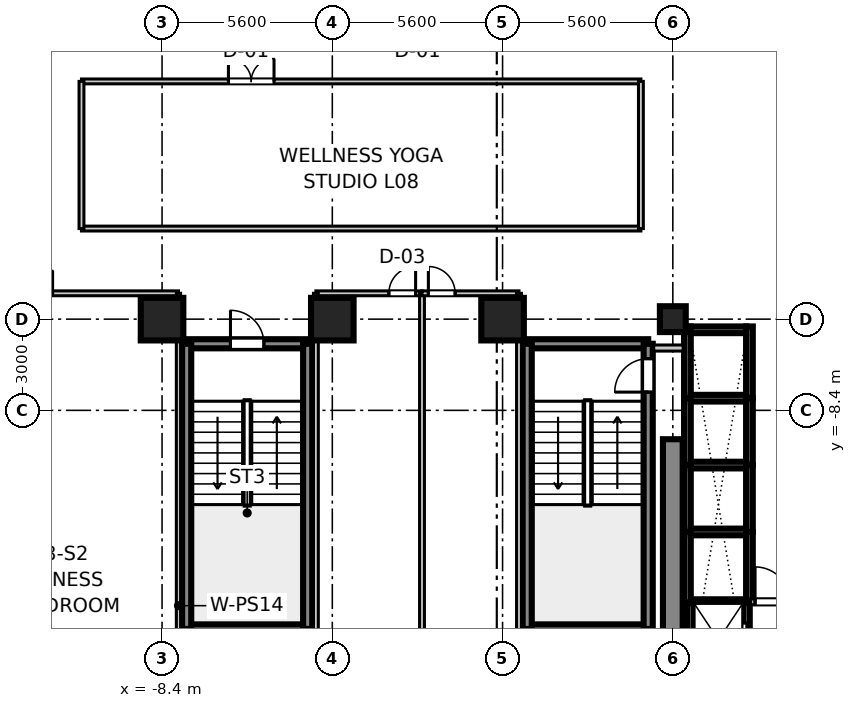
"""IFC4 building model, lengths in metres.
Left out: names, types, materials, properties, quantities, classifications, styles, units other than length and angle.
Written with IfcOpenShell. Run it as: python <this file> out.ifc"""

import sys

from ifc_helpers import new_model, si_unit, direction, frame, frame_2d, origin, origin_2d, place, context, subcontext, project, spatial, rectangle, extrude, source, transform, mapped, element, fill, save


model = new_model("IFC4")
c1 = context("Model", 3, precision=1e-05, world=origin(), true_north=direction((0.0, 1.0)))
c2 = subcontext(c1, "Body", "Model", "MODEL_VIEW")
j1 = project(units=[si_unit("LENGTHUNIT", "METRE"), si_unit("PLANEANGLEUNIT", "RADIAN")], contexts=[c1])
p1 = place(None, origin())
s1 = spatial("IfcSite", under=j1, at=p1, CompositionType="ELEMENT")
p2 = place(p1, origin())
s2 = spatial("IfcBuilding", under=s1, at=p2, CompositionType="ELEMENT")
p3 = place(p2, frame((0.0, 0.0, 39.7)))
s3 = spatial("IfcBuildingStorey", under=s2, at=p3, CompositionType="ELEMENT", Elevation=39.7)
m1 = source(origin(), c2, "Body", "SweptSolid", [
    extrude(rectangle(XDim=1.4, YDim=1.4, at=origin_2d()), origin(), (0.0, 0.0, 1.0), 3.605),
])
for number, where, z_axis, x_axis in (
    (1, (-8.4, -5.4, 0.0), (0.0, 0.0, 1.0), (1.0, 0.0, 0.0)),
    (2, (-2.8, -5.4, 0.0), (0.0, 0.0, 1.0), (1.0, 0.0, 0.0)),
    (3, (2.8, -5.4, 0.0), (0.0, 0.0, 1.0), (1.0, 0.0, 0.0)),
):
    element("IfcColumn", number, at=place(p3, frame(where, z_axis=z_axis, x_axis=x_axis)), inside=s3, PredefinedType="COLUMN", context=c2, shape_type="MappedRepresentation", body=[
        mapped(m1, transform((0.0, 0.0, 0.0), scale=1.0)),
    ])
m2 = source(origin(), c2, "Body", "SweptSolid", [
    extrude(rectangle(XDim=0.85, YDim=0.85, at=origin_2d()), origin(), (0.0, 0.0, 1.0), 3.605),
])
p4 = place(p3, frame((8.4, -5.4, 0.0), z_axis=(0.0, 0.0, 1.0), x_axis=(1.0, 0.0, 0.0)))
e4 = element("IfcColumn", 4, at=p4, inside=s3, PredefinedType="PILASTER", context=c2, shape_type="MappedRepresentation", body=[
    mapped(m2, transform((0.0, 0.0, 0.0), scale=1.0)),
])
m3 = source(origin(), c2, "Body", "SweptSolid", [
    extrude(rectangle(XDim=7.65, YDim=0.65, at=frame_2d((3.825, 0.0))), origin(), (0.0, 0.0, 1.0), 3.37),
])
p5 = place(p3, frame((8.4, -17.0, 0.0), z_axis=(0.0, 0.0, 1.0), x_axis=(0.0, 1.0, 0.0)))
e5 = element("IfcWall", 5, at=p5, inside=s3, PredefinedType="SHEAR", context=c2, shape_type="MappedRepresentation", body=[
    mapped(m3, transform((0.0, 0.0, 0.0), scale=1.0)),
])
m4 = source(origin(), c2, "Body", "SweptSolid", [
    extrude(rectangle(XDim=3.98, YDim=0.3, at=frame_2d((1.99, 0.0))), origin(), (0.0, 0.0, 1.0), 3.37),
])
for number, where, z_axis, x_axis in (
    (6, (3.61, -15.59, 0.0), (0.0, 0.0, 1.0), (1.0, 0.0, 0.0)),
    (7, (3.61, -6.21, 0.0), (0.0, 0.0, 1.0), (1.0, 0.0, 0.0)),
):
    element("IfcWall", number, at=place(p3, frame(where, z_axis=z_axis, x_axis=x_axis)), inside=s3, PredefinedType="SHEAR", context=c2, shape_type="MappedRepresentation", body=[
        mapped(m4, transform((0.0, 0.0, 0.0), scale=1.0)),
    ])
m5 = source(origin(), c2, "Body", "SweptSolid", [
    extrude(rectangle(XDim=9.38, YDim=0.3, at=frame_2d((4.69, 0.0))), origin(), (0.0, 0.0, 1.0), 3.37),
])
p6 = place(p3, frame((3.61, -15.59, 0.0), z_axis=(0.0, 0.0, 1.0), x_axis=(0.0, 1.0, 0.0)))
e8 = element("IfcWall", 8, at=p6, inside=s3, PredefinedType="SHEAR", context=c2, shape_type="MappedRepresentation", body=[
    mapped(m5, transform((0.0, 0.0, 0.0), scale=1.0)),
])
p7 = place(p3, frame((7.59, -15.59, 0.0), z_axis=(0.0, 0.0, 1.0), x_axis=(0.0, 1.0, 0.0)))
e9 = element("IfcWall", 9, at=p7, inside=s3, PredefinedType="SHEAR", context=c2, shape_type="MappedRepresentation", body=[
    mapped(m5, transform((0.0, 0.0, 0.0), scale=1.0)),
])
p8 = place(p7, frame((7.79, 0.0, 0.0)))
e10 = element("IfcOpeningElement", 10, at=p8, cuts=e9, PredefinedType="OPENING", context=c2, shape_type="SweptSolid", body=[
    extrude(rectangle(XDim=1.1, YDim=2.15, at=frame_2d((0.55, 1.075))), frame((0.0, 0.16, 0.0), z_axis=(0.0, -1.0, 0.0), x_axis=(1.0, 0.0, 0.0)), (0.0, 0.0, 1.0), 0.32),
])
p9 = place(p3, frame((-7.59, -15.59, 0.0), z_axis=(0.0, 0.0, 1.0), x_axis=(1.0, 0.0, 0.0)))
e11 = element("IfcWall", 11, at=p9, inside=s3, PredefinedType="SHEAR", context=c2, shape_type="MappedRepresentation", body=[
    mapped(m4, transform((0.0, 0.0, 0.0), scale=1.0)),
])
p10 = place(p3, frame((-7.59, -6.21, 0.0), z_axis=(0.0, 0.0, 1.0), x_axis=(1.0, 0.0, 0.0)))
e12 = element("IfcWall", 12, at=p10, inside=s3, PredefinedType="SHEAR", context=c2, shape_type="MappedRepresentation", body=[
    mapped(m4, transform((0.0, 0.0, 0.0), scale=1.0)),
])
p11 = place(p10, frame((1.44, 0.0, 0.0)))
e13 = element("IfcOpeningElement", 13, at=p11, cuts=e12, PredefinedType="OPENING", context=c2, shape_type="SweptSolid", body=[
    extrude(rectangle(XDim=1.1, YDim=2.15, at=frame_2d((0.55, 1.075))), frame((0.0, 0.16, 0.0), z_axis=(0.0, -1.0, 0.0), x_axis=(1.0, 0.0, 0.0)), (0.0, 0.0, 1.0), 0.32),
])
for number, where, z_axis, x_axis in (
    (14, (-7.59, -15.59, 0.0), (0.0, 0.0, 1.0), (0.0, 1.0, 0.0)),
    (15, (-3.61, -15.59, 0.0), (0.0, 0.0, 1.0), (0.0, 1.0, 0.0)),
):
    element("IfcWall", number, at=place(p3, frame(where, z_axis=z_axis, x_axis=x_axis)), inside=s3, PredefinedType="SHEAR", context=c2, shape_type="MappedRepresentation", body=[
        mapped(m5, transform((0.0, 0.0, 0.0), scale=1.0)),
    ])
m6 = source(origin(), c2, "Body", "SweptSolid", [
    extrude(rectangle(XDim=2.36, YDim=0.22, at=frame_2d((1.18, 0.0))), origin(), (0.0, 0.0, 1.0), 3.37),
])
for number, where, z_axis, x_axis in (
    (16, (8.88, -8.0, 0.0), (0.0, 0.0, 1.0), (0.0, 1.0, 0.0)),
    (17, (10.92, -8.0, 0.0), (0.0, 0.0, 1.0), (0.0, 1.0, 0.0)),
):
    element("IfcWall", number, at=place(p3, frame(where, z_axis=z_axis, x_axis=x_axis)), inside=s3, PredefinedType="SHEAR", context=c2, shape_type="MappedRepresentation", body=[
        mapped(m6, transform((0.0, 0.0, 0.0), scale=1.0)),
    ])
m7 = source(origin(), c2, "Body", "SweptSolid", [
    extrude(rectangle(XDim=1.82, YDim=0.22, at=frame_2d((0.91, 0.0))), origin(), (0.0, 0.0, 1.0), 3.37),
])
p12 = place(p3, frame((8.99, -5.75, 0.0), z_axis=(0.0, 0.0, 1.0), x_axis=(1.0, 0.0, 0.0)))
e18 = element("IfcWall", 18, at=p12, inside=s3, PredefinedType="SHEAR", context=c2, shape_type="MappedRepresentation", body=[
    mapped(m7, transform((0.0, 0.0, 0.0), scale=1.0)),
])
m8 = source(origin(), c2, "Body", "SweptSolid", [
    extrude(rectangle(XDim=2.2, YDim=0.22, at=frame_2d((1.1, 0.0))), origin(), (0.0, 0.0, 1.0), 3.37),
])
for number, where, z_axis, x_axis in (
    (19, (8.88, -10.2, 0.0), (0.0, 0.0, 1.0), (0.0, 1.0, 0.0)),
    (20, (10.92, -10.2, 0.0), (0.0, 0.0, 1.0), (0.0, 1.0, 0.0)),
):
    element("IfcWall", number, at=place(p3, frame(where, z_axis=z_axis, x_axis=x_axis)), inside=s3, PredefinedType="SHEAR", context=c2, shape_type="MappedRepresentation", body=[
        mapped(m8, transform((0.0, 0.0, 0.0), scale=1.0)),
    ])
m9 = source(origin(), c2, "Body", "SweptSolid", [
    extrude(rectangle(XDim=1.82, YDim=0.22, at=frame_2d((0.91, 0.0))), origin(), (0.0, 0.0, 1.0), 3.65),
])
p13 = place(p3, frame((8.99, -8.0, 0.0), z_axis=(0.0, 0.0, 1.0), x_axis=(1.0, 0.0, 0.0)))
e21 = element("IfcWall", 21, at=p13, inside=s3, PredefinedType="SHEAR", context=c2, shape_type="MappedRepresentation", body=[
    mapped(m9, transform((0.0, 0.0, 0.0), scale=1.0)),
])
for number, where, z_axis, x_axis in (
    (22, (8.88, -12.4, 0.0), (0.0, 0.0, 1.0), (0.0, 1.0, 0.0)),
    (23, (10.92, -12.4, 0.0), (0.0, 0.0, 1.0), (0.0, 1.0, 0.0)),
):
    element("IfcWall", number, at=place(p3, frame(where, z_axis=z_axis, x_axis=x_axis)), inside=s3, PredefinedType="SHEAR", context=c2, shape_type="MappedRepresentation", body=[
        mapped(m8, transform((0.0, 0.0, 0.0), scale=1.0)),
    ])
p14 = place(p3, frame((8.99, -10.2, 0.0), z_axis=(0.0, 0.0, 1.0), x_axis=(1.0, 0.0, 0.0)))
e24 = element("IfcWall", 24, at=p14, inside=s3, PredefinedType="SHEAR", context=c2, shape_type="MappedRepresentation", body=[
    mapped(m9, transform((0.0, 0.0, 0.0), scale=1.0)),
])
m10 = source(origin(), c2, "Body", "SweptSolid", [
    extrude(rectangle(XDim=2.325, YDim=0.22, at=frame_2d((1.163, 0.0))), origin(), (0.0, 0.0, 1.0), 3.37),
])
for number, where, z_axis, x_axis in (
    (25, (8.88, -14.725, 0.0), (0.0, 0.0, 1.0), (0.0, 1.0, 0.0)),
    (26, (10.92, -14.725, 0.0), (0.0, 0.0, 1.0), (0.0, 1.0, 0.0)),
):
    element("IfcWall", number, at=place(p3, frame(where, z_axis=z_axis, x_axis=x_axis)), inside=s3, PredefinedType="SHEAR", context=c2, shape_type="MappedRepresentation", body=[
        mapped(m10, transform((0.0, 0.0, 0.0), scale=1.0)),
    ])
p15 = place(p3, frame((8.99, -12.4, 0.0), z_axis=(0.0, 0.0, 1.0), x_axis=(1.0, 0.0, 0.0)))
e27 = element("IfcWall", 27, at=p15, inside=s3, PredefinedType="SHEAR", context=c2, shape_type="MappedRepresentation", body=[
    mapped(m9, transform((0.0, 0.0, 0.0), scale=1.0)),
])
m11 = source(origin(), c2, "Body", "SweptSolid", [
    extrude(rectangle(XDim=2.635, YDim=0.22, at=frame_2d((1.317, 0.0))), origin(), (0.0, 0.0, 1.0), 3.37),
])
p16 = place(p3, frame((8.98, -17.36, 0.0), z_axis=(0.0, 0.0, 1.0), x_axis=(0.0, 1.0, 0.0)))
e28 = element("IfcWall", 28, at=p16, inside=s3, PredefinedType="SHEAR", context=c2, shape_type="MappedRepresentation", body=[
    mapped(m11, transform((0.0, 0.0, 0.0), scale=1.0)),
])
p17 = place(p3, frame((10.82, -17.36, 0.0), z_axis=(0.0, 0.0, 1.0), x_axis=(0.0, 1.0, 0.0)))
e29 = element("IfcWall", 29, at=p17, inside=s3, PredefinedType="SHEAR", context=c2, shape_type="MappedRepresentation", body=[
    mapped(m11, transform((0.0, 0.0, 0.0), scale=1.0)),
])
p18 = place(p17, frame((0.86, 0.0, 0.0)))
e30 = element("IfcOpeningElement", 30, at=p18, cuts=e29, PredefinedType="OPENING", context=c2, shape_type="SweptSolid", body=[
    extrude(rectangle(XDim=1.1, YDim=2.2, at=frame_2d((0.55, 1.1))), frame((0.0, 0.12, 0.0), z_axis=(0.0, -1.0, 0.0), x_axis=(1.0, 0.0, 0.0)), (0.0, 0.0, 1.0), 0.24),
])
m12 = source(origin(), c2, "Body", "SweptSolid", [
    extrude(rectangle(XDim=1.62, YDim=0.22, at=frame_2d((0.81, 0.0))), origin(), (0.0, 0.0, 1.0), 3.65),
])
p19 = place(p3, frame((9.09, -14.725, 0.0), z_axis=(0.0, 0.0, 1.0), x_axis=(1.0, 0.0, 0.0)))
e31 = element("IfcWall", 31, at=p19, inside=s3, PredefinedType="SHEAR", context=c2, shape_type="MappedRepresentation", body=[
    mapped(m12, transform((0.0, 0.0, 0.0), scale=1.0)),
])
m13 = source(origin(), c2, "Body", "SweptSolid", [
    extrude(rectangle(XDim=1.46, YDim=0.2, at=frame_2d((0.73, 0.0))), origin(), (0.0, 0.0, 1.0), 2.71),
])
p20 = place(p3, frame((10.96, -14.7, 0.0), z_axis=(0.0, 0.0, 1.0), x_axis=(1.0, 0.0, 0.0)))
e32 = element("IfcWall", 32, at=p20, inside=s3, PredefinedType="PARTITIONING", context=c2, shape_type="MappedRepresentation", body=[
    mapped(m13, transform((0.0, 0.0, 0.0), scale=1.0)),
])
p21 = place(p20, frame((0.145, 0.0, 0.0)))
e33 = element("IfcOpeningElement", 33, at=p21, cuts=e32, PredefinedType="OPENING", context=c2, shape_type="SweptSolid", body=[
    extrude(rectangle(XDim=1.15, YDim=2.15, at=frame_2d((0.575, 1.075))), frame((0.0, 0.11, 0.0), z_axis=(0.0, -1.0, 0.0), x_axis=(1.0, 0.0, 0.0)), (0.0, 0.0, 1.0), 0.22),
])
m14 = source(origin(), c2, "Body", "SweptSolid", [
    extrude(rectangle(XDim=0.97, YDim=0.2, at=frame_2d((0.485, 0.0))), origin(), (0.0, 0.0, 1.0), 2.71),
])
p22 = place(p3, frame((7.77, -6.35, 0.0), z_axis=(0.0, 0.0, 1.0), x_axis=(1.0, 0.0, 0.0)))
e34 = element("IfcWall", 34, at=p22, inside=s3, PredefinedType="PARTITIONING", context=c2, shape_type="MappedRepresentation", body=[
    mapped(m14, transform((0.0, 0.0, 0.0), scale=1.0)),
])
m15 = source(origin(), c2, "Body", "SweptSolid", [
    extrude(rectangle(XDim=14.5, YDim=0.16, at=frame_2d((7.25, 0.0))), origin(), (0.0, 0.0, 1.0), 2.71),
])
p23 = place(p3, frame((-22.36, -4.55, 0.0), z_axis=(0.0, 0.0, 1.0), x_axis=(1.0, 0.0, 0.0)))
e35 = element("IfcWall", 35, at=p23, inside=s3, PredefinedType="PARTITIONING", context=c2, shape_type="MappedRepresentation", body=[
    mapped(m15, transform((0.0, 0.0, 0.0), scale=1.0)),
])
p24 = place(p23, frame((0.907, 0.0, 0.0)))
e36 = element("IfcOpeningElement", 36, at=p24, cuts=e35, PredefinedType="OPENING", context=c2, shape_type="SweptSolid", body=[
    extrude(rectangle(XDim=0.95, YDim=2.1, at=frame_2d((0.475, 1.05))), frame((0.0, 0.09, 0.0), z_axis=(0.0, -1.0, 0.0), x_axis=(1.0, 0.0, 0.0)), (0.0, 0.0, 1.0), 0.18),
])
p25 = place(p23, frame((8.86, 0.0, 0.0)))
e37 = element("IfcOpeningElement", 37, at=p25, cuts=e35, PredefinedType="OPENING", context=c2, shape_type="SweptSolid", body=[
    extrude(rectangle(XDim=1.5, YDim=2.15, at=frame_2d((0.75, 1.075))), frame((0.0, 0.09, 0.0), z_axis=(0.0, -1.0, 0.0), x_axis=(1.0, 0.0, 0.0)), (0.0, 0.0, 1.0), 0.18),
])
m16 = source(origin(), c2, "Body", "SweptSolid", [
    extrude(rectangle(XDim=20.55, YDim=0.14, at=frame_2d((10.275, 0.0))), origin(), (0.0, 0.0, 1.0), 2.71),
])
p26 = place(p3, frame((-7.86, -25.1, 0.0), z_axis=(0.0, 0.0, 1.0), x_axis=(0.0, 1.0, 0.0)))
e38 = element("IfcWall", 38, at=p26, inside=s3, PredefinedType="PARTITIONING", context=c2, shape_type="MappedRepresentation", body=[
    mapped(m16, transform((0.0, 0.0, 0.0), scale=1.0)),
])
m17 = source(origin(), c2, "Body", "SweptSolid", [
    extrude(rectangle(XDim=3.49, YDim=0.16, at=frame_2d((1.745, 0.0))), origin(), (0.0, 0.0, 1.0), 2.71),
])
p27 = place(p3, frame((-3.34, -4.55, 0.0), z_axis=(0.0, 0.0, 1.0), x_axis=(1.0, 0.0, 0.0)))
e39 = element("IfcWall", 39, at=p27, inside=s3, PredefinedType="PARTITIONING", context=c2, shape_type="MappedRepresentation", body=[
    mapped(m17, transform((0.0, 0.0, 0.0), scale=1.0)),
])
p28 = place(p27, frame((2.4, 0.0, 0.0)))
e40 = element("IfcOpeningElement", 40, at=p28, cuts=e39, PredefinedType="OPENING", context=c2, shape_type="SweptSolid", body=[
    extrude(rectangle(XDim=0.88, YDim=2.1, at=frame_2d((0.44, 1.05))), frame((0.0, 0.09, 0.0), z_axis=(0.0, -1.0, 0.0), x_axis=(1.0, 0.0, 0.0)), (0.0, 0.0, 1.0), 0.18),
])
m18 = source(origin(), c2, "Body", "SweptSolid", [
    extrude(rectangle(XDim=20.55, YDim=0.16, at=frame_2d((10.275, 0.0))), origin(), (0.0, 0.0, 1.0), 2.71),
])
for number, where, z_axis, x_axis in (
    (41, (-3.34, -25.1, 0.0), (0.0, 0.0, 1.0), (0.0, 1.0, 0.0)),
    (42, (0.15, -25.1, 0.0), (0.0, 0.0, 1.0), (0.0, 1.0, 0.0)),
):
    element("IfcWall", number, at=place(p3, frame(where, z_axis=z_axis, x_axis=x_axis)), inside=s3, PredefinedType="PARTITIONING", context=c2, shape_type="MappedRepresentation", body=[
        mapped(m18, transform((0.0, 0.0, 0.0), scale=1.0)),
    ])
m19 = source(origin(), c2, "Body", "SweptSolid", [
    extrude(rectangle(XDim=3.19, YDim=0.16, at=frame_2d((1.595, 0.0))), origin(), (0.0, 0.0, 1.0), 2.71),
])
p29 = place(p3, frame((0.15, -4.55, 0.0), z_axis=(0.0, 0.0, 1.0), x_axis=(1.0, 0.0, 0.0)))
e43 = element("IfcWall", 43, at=p29, inside=s3, PredefinedType="PARTITIONING", context=c2, shape_type="MappedRepresentation", body=[
    mapped(m19, transform((0.0, 0.0, 0.0), scale=1.0)),
])
p30 = place(p29, frame((0.21, 0.0, 0.0)))
e44 = element("IfcOpeningElement", 44, at=p30, cuts=e43, PredefinedType="OPENING", context=c2, shape_type="SweptSolid", body=[
    extrude(rectangle(XDim=0.88, YDim=2.1, at=frame_2d((0.44, 1.05))), frame((0.0, 0.09, 0.0), z_axis=(0.0, -1.0, 0.0), x_axis=(1.0, 0.0, 0.0)), (0.0, 0.0, 1.0), 0.18),
])
p31 = place(p3, frame((3.34, -25.1, 0.0), z_axis=(0.0, 0.0, 1.0), x_axis=(0.0, 1.0, 0.0)))
e45 = element("IfcWall", 45, at=p31, inside=s3, PredefinedType="PARTITIONING", context=c2, shape_type="MappedRepresentation", body=[
    mapped(m18, transform((0.0, 0.0, 0.0), scale=1.0)),
])
m20 = source(origin(), c2, "Body", "SweptSolid", [
    extrude(rectangle(XDim=18.4, YDim=0.16, at=frame_2d((9.2, 0.0))), origin(), (0.0, 0.0, 1.0), 2.71),
])
p32 = place(p3, frame((-11.05, -2.42, 0.0), z_axis=(0.0, 0.0, 1.0), x_axis=(1.0, 0.0, 0.0)))
e46 = element("IfcWall", 46, at=p32, inside=s3, PredefinedType="PARTITIONING", context=c2, shape_type="MappedRepresentation", body=[
    mapped(m20, transform((0.0, 0.0, 0.0), scale=1.0)),
])
p33 = place(p3, frame((-11.05, 2.42, 0.0), z_axis=(0.0, 0.0, 1.0), x_axis=(1.0, 0.0, 0.0)))
e47 = element("IfcWall", 47, at=p33, inside=s3, PredefinedType="PARTITIONING", context=c2, shape_type="MappedRepresentation", body=[
    mapped(m20, transform((0.0, 0.0, 0.0), scale=1.0)),
])
p34 = place(p33, frame((4.833, 0.0, 0.0)))
e48 = element("IfcOpeningElement", 48, at=p34, cuts=e47, PredefinedType="OPENING", context=c2, shape_type="SweptSolid", body=[
    extrude(rectangle(XDim=1.5, YDim=2.15, at=frame_2d((0.75, 1.075))), frame((0.0, 0.09, 0.0), z_axis=(0.0, -1.0, 0.0), x_axis=(1.0, 0.0, 0.0)), (0.0, 0.0, 1.0), 0.18),
])
m21 = source(origin(), c2, "Body", "SweptSolid", [
    extrude(rectangle(XDim=4.84, YDim=0.16, at=frame_2d((2.42, 0.0))), origin(), (0.0, 0.0, 1.0), 2.71),
])
for number, where, z_axis, x_axis in (
    (49, (-11.05, -2.42, 0.0), (0.0, 0.0, 1.0), (0.0, 1.0, 0.0)),
    (50, (7.35, -2.42, 0.0), (0.0, 0.0, 1.0), (0.0, 1.0, 0.0)),
):
    element("IfcWall", number, at=place(p3, frame(where, z_axis=z_axis, x_axis=x_axis)), inside=s3, PredefinedType="PARTITIONING", context=c2, shape_type="MappedRepresentation", body=[
        mapped(m21, transform((0.0, 0.0, 0.0), scale=1.0)),
    ])
m22 = source(origin(), c2, "Body", "SweptSolid", [
    extrude(rectangle(XDim=1.1, YDim=2.15, at=frame_2d((0.55, 1.075))), frame((0.0, 0.025, 0.0), z_axis=(0.0, -1.0, 0.0), x_axis=(1.0, 0.0, 0.0)), (0.0, 0.0, 1.0), 0.05),
])
p35 = place(p8, origin())
e51 = element("IfcDoor", 51, at=p35, inside=s3, OperationType="SINGLE_SWING_LEFT", PredefinedType="DOOR", context=c2, shape_type="MappedRepresentation", body=[
    mapped(m22, transform((0.0, 0.0, 0.0), scale=1.0)),
])
fill(e10, e51)
p36 = place(p11, frame((1.1, 0.0, 0.0), z_axis=(0.0, 0.0, 1.0), x_axis=(-1.0, 0.0, 0.0)))
e52 = element("IfcDoor", 52, at=p36, inside=s3, OperationType="SINGLE_SWING_LEFT", PredefinedType="DOOR", context=c2, shape_type="MappedRepresentation", body=[
    mapped(m22, transform((0.0, 0.0, 0.0), scale=1.0)),
])
fill(e13, e52)
m23 = source(origin(), c2, "Body", "SweptSolid", [
    extrude(rectangle(XDim=1.1, YDim=2.2, at=frame_2d((0.55, 1.1))), frame((0.0, 0.025, 0.0), z_axis=(0.0, -1.0, 0.0), x_axis=(1.0, 0.0, 0.0)), (0.0, 0.0, 1.0), 0.05),
])
p37 = place(p18, frame((1.1, 0.0, 0.0), z_axis=(0.0, 0.0, 1.0), x_axis=(-1.0, 0.0, 0.0)))
e53 = element("IfcDoor", 53, at=p37, inside=s3, OperationType="DOUBLE_DOOR_SLIDING", PredefinedType="DOOR", context=c2, shape_type="MappedRepresentation", body=[
    mapped(m23, transform((0.0, 0.0, 0.0), scale=1.0)),
])
fill(e30, e53)
m24 = source(origin(), c2, "Body", "SweptSolid", [
    extrude(rectangle(XDim=1.15, YDim=2.15, at=frame_2d((0.575, 1.075))), frame((0.0, 0.025, 0.0), z_axis=(0.0, -1.0, 0.0), x_axis=(1.0, 0.0, 0.0)), (0.0, 0.0, 1.0), 0.05),
])
p38 = place(p21, origin())
e54 = element("IfcDoor", 54, at=p38, inside=s3, OperationType="SINGLE_SWING_LEFT", PredefinedType="DOOR", context=c2, shape_type="MappedRepresentation", body=[
    mapped(m24, transform((0.0, 0.0, 0.0), scale=1.0)),
])
fill(e33, e54)
m25 = source(origin(), c2, "Body", "SweptSolid", [
    extrude(rectangle(XDim=1.5, YDim=2.15, at=frame_2d((0.75, 1.075))), frame((0.0, 0.025, 0.0), z_axis=(0.0, -1.0, 0.0), x_axis=(1.0, 0.0, 0.0)), (0.0, 0.0, 1.0), 0.05),
])
p39 = place(p25, frame((1.5, 0.0, 0.0), z_axis=(0.0, 0.0, 1.0), x_axis=(-1.0, 0.0, 0.0)))
e55 = element("IfcDoor", 55, at=p39, inside=s3, OperationType="DOUBLE_DOOR_SINGLE_SWING", PredefinedType="DOOR", context=c2, shape_type="MappedRepresentation", body=[
    mapped(m25, transform((0.0, 0.0, 0.0), scale=1.0)),
])
fill(e37, e55)
m26 = source(origin(), c2, "Body", "SweptSolid", [
    extrude(rectangle(XDim=0.88, YDim=2.1, at=frame_2d((0.44, 1.05))), frame((0.0, 0.025, 0.0), z_axis=(0.0, -1.0, 0.0), x_axis=(1.0, 0.0, 0.0)), (0.0, 0.0, 1.0), 0.05),
])
p40 = place(p28, frame((0.88, 0.0, 0.0), z_axis=(0.0, 0.0, 1.0), x_axis=(-1.0, 0.0, 0.0)))
e56 = element("IfcDoor", 56, at=p40, inside=s3, OperationType="SINGLE_SWING_RIGHT", PredefinedType="DOOR", context=c2, shape_type="MappedRepresentation", body=[
    mapped(m26, transform((0.0, 0.0, 0.0), scale=1.0)),
])
fill(e40, e56)
p41 = place(p30, frame((0.88, 0.0, 0.0), z_axis=(0.0, 0.0, 1.0), x_axis=(-1.0, 0.0, 0.0)))
e57 = element("IfcDoor", 57, at=p41, inside=s3, OperationType="SINGLE_SWING_LEFT", PredefinedType="DOOR", context=c2, shape_type="MappedRepresentation", body=[
    mapped(m26, transform((0.0, 0.0, 0.0), scale=1.0)),
])
fill(e44, e57)
p42 = place(p34, frame((1.5, 0.0, 0.0), z_axis=(0.0, 0.0, 1.0), x_axis=(-1.0, 0.0, 0.0)))
e58 = element("IfcDoor", 58, at=p42, inside=s3, OperationType="DOUBLE_DOOR_SINGLE_SWING", PredefinedType="DOOR", context=c2, shape_type="MappedRepresentation", body=[
    mapped(m25, transform((0.0, 0.0, 0.0), scale=1.0)),
])
fill(e48, e58)
save(model, sys.argv[1])
